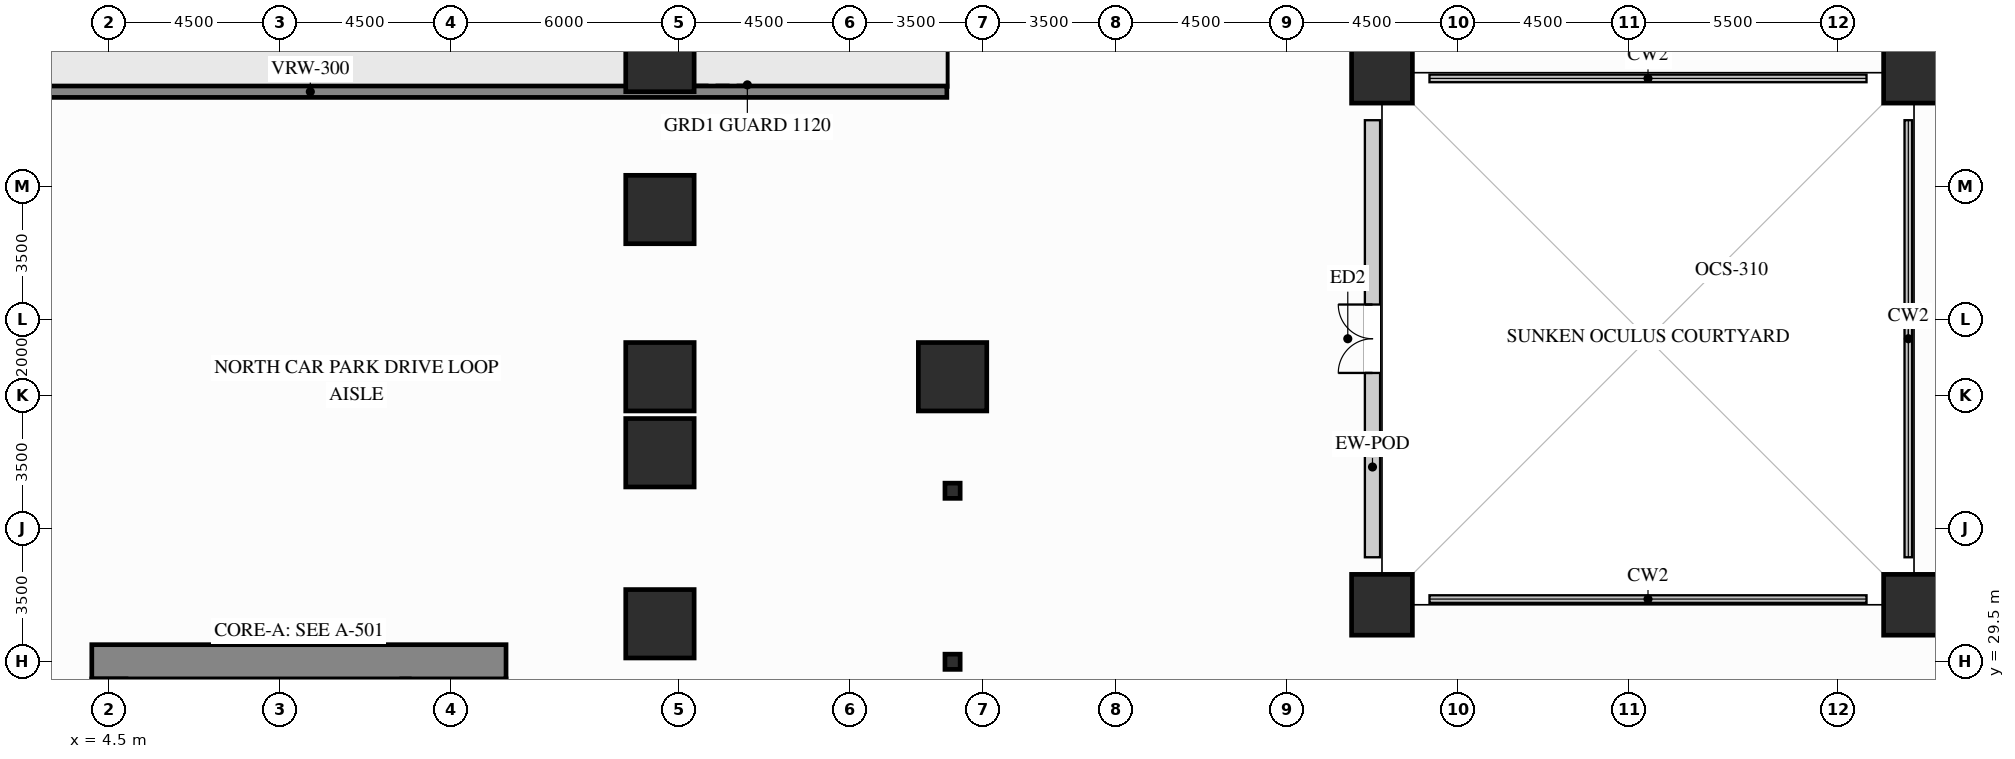
"""IFC4 building model, lengths in metres.
Left out: names, types, materials, properties, quantities, classifications, styles, units other than length and angle.
Written with IfcOpenShell. Run it as: python <this file> out.ifc"""

import sys

from ifc_helpers import new_model, si_unit, direction, frame, frame_2d, origin, origin_2d, place, context, subcontext, project, spatial, rectangle, hollow_rectangle, extrude, source, transform, mapped, element, fill, save


model = new_model("IFC4")
c1 = context("Model", 3, precision=1e-05, world=origin(), true_north=direction((0.0, 1.0)))
c2 = subcontext(c1, "Body", "Model", "MODEL_VIEW")
j1 = project(units=[si_unit("LENGTHUNIT", "METRE"), si_unit("PLANEANGLEUNIT", "RADIAN")], contexts=[c1])
p1 = place(None, origin())
s1 = spatial("IfcSite", under=j1, at=p1, CompositionType="ELEMENT")
p2 = place(p1, origin())
s2 = spatial("IfcBuilding", under=s1, at=p2, CompositionType="ELEMENT")
p3 = place(p2, frame((0.0, 0.0, -4.5)))
s3 = spatial("IfcBuildingStorey", under=s2, at=p3, CompositionType="ELEMENT", Elevation=-4.5)
m1 = source(origin(), c2, "Body", "SweptSolid", [
    extrude(rectangle(XDim=1.6, YDim=1.6, at=origin_2d()), origin(), (0.0, 0.0, 1.0), 4.24),
])
for number, where, z_axis, x_axis in (
    (1, (38.0, 31.0, 0.0), (0.0, 0.0, 1.0), (1.0, 0.0, 0.0)),
    (2, (52.0, 31.0, 0.0), (0.0, 0.0, 1.0), (1.0, 0.0, 0.0)),
    (3, (38.0, 45.0, 0.0), (0.0, 0.0, 1.0), (1.0, 0.0, 0.0)),
    (4, (52.0, 45.0, 0.0), (0.0, 0.0, 1.0), (1.0, 0.0, 0.0)),
):
    element("IfcColumn", number, at=place(p3, frame(where, z_axis=z_axis, x_axis=x_axis)), inside=s3, PredefinedType="COLUMN", context=c2, shape_type="MappedRepresentation", body=[
        mapped(m1, transform((0.0, 0.0, 0.0), x_axis=(1.0, 0.0, 0.0), y_axis=(0.0, 1.0, 0.0), z_axis=(0.0, 0.0, 1.0))),
    ])
m2 = source(origin(), c2, "Body", "SweptSolid", [
    extrude(rectangle(XDim=1.8, YDim=1.8, at=origin_2d()), origin(), (0.0, 0.0, 1.0), 4.24),
])
for number, where, z_axis, x_axis in (
    (5, (26.7, 37.0, 0.0), (0.0, 0.0, 1.0), (1.0, 0.0, 0.0)),
    (6, (19.0, 30.5, 0.0), (0.0, 0.0, 1.0), (1.0, 0.0, 0.0)),
    (7, (19.0, 35.0, 0.0), (0.0, 0.0, 1.0), (1.0, 0.0, 0.0)),
    (8, (19.0, 37.0, 0.0), (0.0, 0.0, 1.0), (1.0, 0.0, 0.0)),
    (9, (19.0, 41.4, 0.0), (0.0, 0.0, 1.0), (1.0, 0.0, 0.0)),
    (10, (19.0, 45.4, 0.0), (0.0, 0.0, 1.0), (1.0, 0.0, 0.0)),
):
    element("IfcColumn", number, at=place(p3, frame(where, z_axis=z_axis, x_axis=x_axis)), inside=s3, PredefinedType="COLUMN", context=c2, shape_type="MappedRepresentation", body=[
        mapped(m2, transform((0.0, 0.0, 0.0), x_axis=(1.0, 0.0, 0.0), y_axis=(0.0, 1.0, 0.0), z_axis=(0.0, 0.0, 1.0))),
    ])
m3 = source(origin(), c2, "Body", "SweptSolid", [
    extrude(hollow_rectangle(XDim=0.4, YDim=0.4, WallThickness=0.02, at=origin_2d()), origin(), (0.0, 0.0, 1.0), 4.24),
])
for number, where, z_axis, x_axis in (
    (11, (26.7, 29.5, 0.0), (0.0, 0.0, 1.0), (1.0, 0.0, 0.0)),
    (12, (26.7, 34.0, 0.0), (0.0, 0.0, 1.0), (1.0, 0.0, 0.0)),
):
    element("IfcColumn", number, at=place(p3, frame(where, z_axis=z_axis, x_axis=x_axis)), inside=s3, PredefinedType="PILASTER", context=c2, shape_type="MappedRepresentation", body=[
        mapped(m3, transform((0.0, 0.0, 0.0), x_axis=(1.0, 0.0, 0.0), y_axis=(0.0, 1.0, 0.0), z_axis=(0.0, 0.0, 1.0))),
    ])
m4 = source(origin(), c2, "Body", "SweptSolid", [
    extrude(rectangle(XDim=10.9, YDim=0.9, at=frame_2d((5.45, 0.0))), origin(), (0.0, 0.0, 1.0), 4.24),
])
p4 = place(p3, frame((4.05, 29.5, 0.0), z_axis=(0.0, 0.0, 1.0), x_axis=(1.0, 0.0, 0.0)))
e13 = element("IfcWall", 13, at=p4, inside=s3, PredefinedType="SHEAR", context=c2, shape_type="MappedRepresentation", body=[
    mapped(m4, transform((0.0, 0.0, 0.0), x_axis=(1.0, 0.0, 0.0), y_axis=(0.0, 1.0, 0.0), z_axis=(0.0, 0.0, 1.0))),
])
p5 = place(p3, frame((37.75, 32.25, 0.0), z_axis=(0.0, 0.0, 1.0), x_axis=(0.0, 1.0, 0.0)))
e14 = element("IfcWall", 14, at=p5, inside=s3, PredefinedType="SOLIDWALL", context=c2, shape_type="SweptSolid", body=[
    extrude(rectangle(XDim=11.5, YDim=0.4, at=frame_2d((5.75, 0.0))), origin(), (0.0, 0.0, 1.0), 4.035),
])
p6 = place(p5, frame((4.85, 0.0, 0.0)))
e15 = element("IfcOpeningElement", 15, at=p6, cuts=e14, PredefinedType="OPENING", context=c2, shape_type="SweptSolid", body=[
    extrude(rectangle(XDim=1.8, YDim=2.2, at=frame_2d((0.9, 1.1))), frame((0.0, 0.21, 0.0), z_axis=(0.0, -1.0, 0.0), x_axis=(1.0, 0.0, 0.0)), (0.0, 0.0, 1.0), 0.42),
])
m5 = source(origin(), c2, "Body", "SweptSolid", [
    extrude(rectangle(XDim=34.3, YDim=0.3, at=frame_2d((17.15, 0.0))), origin(), (0.0, 0.0, 1.0), 4.2),
])
p7 = place(p3, frame((-7.75, 44.5, 0.0), z_axis=(0.0, 0.0, 1.0), x_axis=(1.0, 0.0, 0.0)))
e16 = element("IfcWall", 16, at=p7, inside=s3, PredefinedType="SHEAR", context=c2, shape_type="MappedRepresentation", body=[
    mapped(m5, transform((0.0, 0.0, 0.0), x_axis=(1.0, 0.0, 0.0), y_axis=(0.0, 1.0, 0.0), z_axis=(0.0, 0.0, 1.0))),
])
m6 = source(origin(), c2, "Body", "SweptSolid", [
    extrude(rectangle(XDim=1.8, YDim=2.2, at=frame_2d((0.9, 1.1))), frame((0.0, 0.025, 0.0), z_axis=(0.0, -1.0, 0.0), x_axis=(1.0, 0.0, 0.0)), (0.0, 0.0, 1.0), 0.05),
])
p8 = place(p6, origin())
e17 = element("IfcDoor", 17, at=p8, inside=s3, OperationType="DOUBLE_DOOR_SINGLE_SWING", PredefinedType="DOOR", context=c2, shape_type="MappedRepresentation", body=[
    mapped(m6, transform((0.0, 0.0, 0.0), x_axis=(1.0, 0.0, 0.0), y_axis=(0.0, 1.0, 0.0), z_axis=(0.0, 0.0, 1.0))),
])
fill(e15, e17)
save(model, sys.argv[1])
